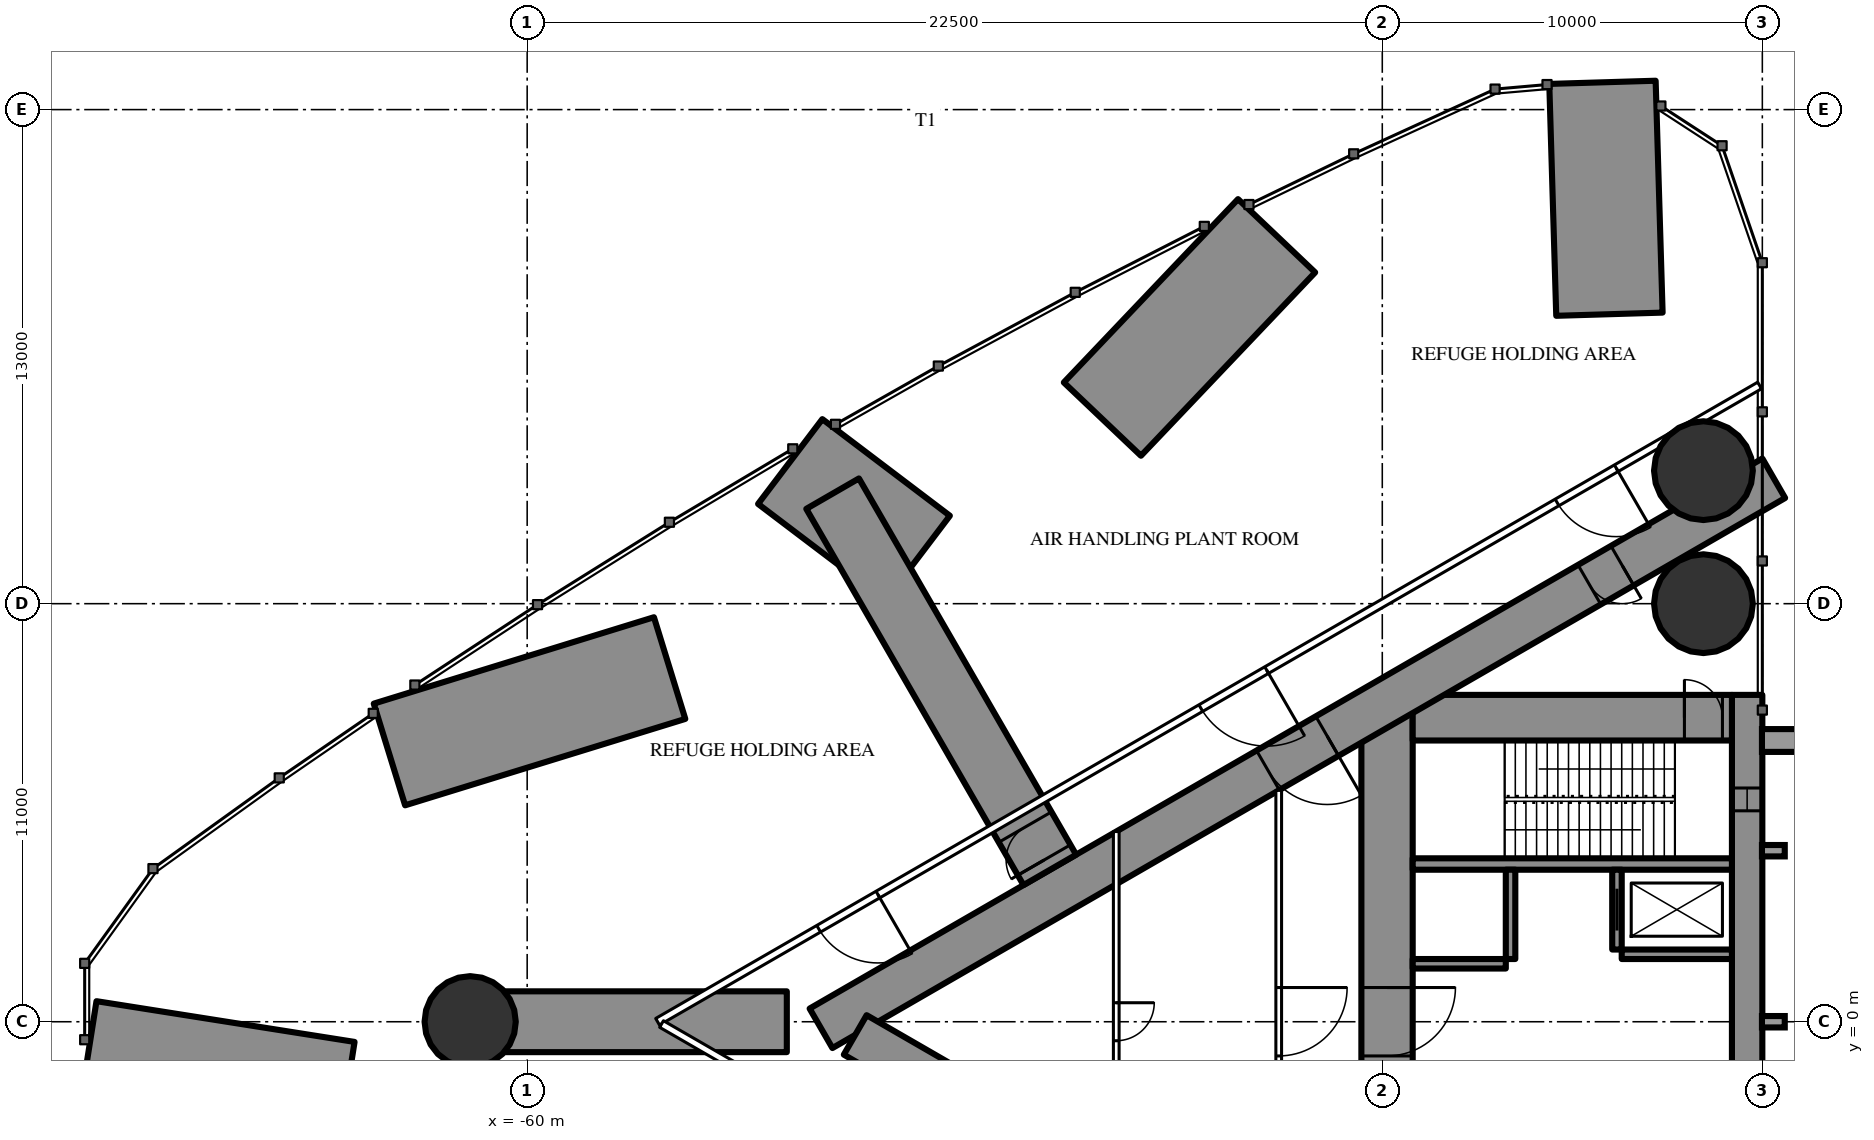
"""IFC4 building model, lengths in metres.
Left out: names, types, materials, properties, quantities, classifications, styles, units other than length and angle.
Written with IfcOpenShell. Run it as: python <this file> out.ifc"""

import sys

from ifc_helpers import new_model, si_unit, direction, frame, frame_2d, origin, origin_2d, place, context, subcontext, project, spatial, rectangle, circle, hollow_circle, extrude, element, fill, save


model = new_model("IFC4")
c1 = context("Model", 3, precision=1e-05, world=origin(), true_north=direction((0.0, 1.0)))
c2 = subcontext(c1, "Body", "Model", "MODEL_VIEW")
j1 = project(units=[si_unit("LENGTHUNIT", "METRE"), si_unit("PLANEANGLEUNIT", "RADIAN")], contexts=[c1])
p1 = place(None, origin())
s1 = spatial("IfcSite", under=j1, at=p1, CompositionType="ELEMENT")
p2 = place(p1, origin())
s2 = spatial("IfcBuilding", under=s1, at=p2, CompositionType="ELEMENT")
p3 = place(p2, frame((0.0, 0.0, 146.7)))
s3 = spatial("IfcBuildingStorey", under=s2, at=p3, CompositionType="ELEMENT", Elevation=146.7)
p4 = place(p3, frame((-71.551, -0.842, 0.0), z_axis=(0.0, 0.0, 1.0), x_axis=(0.987774767093, -0.155887810603, 0.0)))
e1 = element("IfcWall", 1, at=p4, inside=s3, PredefinedType="SHEAR", context=c2, shape_type="SweptSolid", body=[
    extrude(rectangle(XDim=6.875, YDim=2.8, at=frame_2d((3.438, 0.0))), origin(), (0.0, 0.0, 1.0), 6.0),
])
p5 = place(p3, frame((-31.707, 24.718, 0.0), z_axis=(0.0, 0.0, 1.0), x_axis=(0.029997298421, -0.999549979785, 0.0)))
e2 = element("IfcWall", 2, at=p5, inside=s3, PredefinedType="SHEAR", context=c2, shape_type="SweptSolid", body=[
    extrude(rectangle(XDim=6.104, YDim=2.8, at=frame_2d((3.052, 0.0))), origin(), (0.0, 0.0, 1.0), 6.0),
])
for number, where, z_axis, x_axis in (
    (3, (-29.05, 11.0, 0.0), (0.0, 0.0, 1.0), (1.0, 0.0, 0.0)),
    (4, (-29.05, 14.5, 0.0), (0.0, 0.0, 1.0), (1.0, 0.0, 0.0)),
):
    element("IfcColumn", number, at=place(p3, frame(where, z_axis=z_axis, x_axis=x_axis)), inside=s3, PredefinedType="COLUMN", context=c2, shape_type="SweptSolid", body=[
        extrude(hollow_circle(Radius=1.3, WallThickness=0.1, at=origin_2d()), origin(), (0.0, 0.0, 1.0), 6.0),
    ])
p6 = place(p3, frame((-40.281, 20.681, 0.0), z_axis=(0.0, 0.0, 1.0), x_axis=(-0.688883466121, -0.724872106033, 0.0)))
e5 = element("IfcWall", 5, at=p6, inside=s3, PredefinedType="SHEAR", context=c2, shape_type="SweptSolid", body=[
    extrude(rectangle(XDim=6.655, YDim=2.8, at=frame_2d((3.328, 0.0))), origin(), (0.0, 0.0, 1.0), 6.0),
])
p7 = place(p3, frame((-53.079, 14.74, 0.0), z_axis=(0.0, 0.0, 1.0), x_axis=(0.797075233676, -0.603880014457, 0.0)))
e6 = element("IfcWall", 6, at=p7, inside=s3, PredefinedType="SHEAR", context=c2, shape_type="SweptSolid", body=[
    extrude(rectangle(XDim=4.211, YDim=2.8, at=frame_2d((2.105, 0.0))), origin(), (0.0, 0.0, 1.0), 6.0),
])
p8 = place(p3, frame((-63.625, 7.032, 0.0), z_axis=(0.0, 0.0, 1.0), x_axis=(0.955592035737, 0.29469282522, 0.0)))
e7 = element("IfcWall", 7, at=p8, inside=s3, PredefinedType="SHEAR", context=c2, shape_type="SweptSolid", body=[
    extrude(rectangle(XDim=7.715, YDim=2.8, at=frame_2d((3.858, 0.0))), origin(), (0.0, 0.0, 1.0), 6.0),
])
p9 = place(p3, frame((-61.5, 0.0, 0.0), z_axis=(0.0, 0.0, 1.0), x_axis=(1.0, 0.0, 0.0)))
e8 = element("IfcColumn", 8, at=p9, inside=s3, PredefinedType="COLUMN", context=c2, shape_type="SweptSolid", body=[
    extrude(circle(Radius=1.2, at=origin_2d()), origin(), (0.0, 0.0, 1.0), 6.0),
])
p10 = place(p3, frame((-27.9, 8.6, 0.0), z_axis=(0.0, 0.0, 1.0), x_axis=(0.0, -1.0, 0.0)))
e9 = element("IfcWall", 9, at=p10, inside=s3, PredefinedType="SHEAR", context=c2, shape_type="SweptSolid", body=[
    extrude(rectangle(XDim=17.2, YDim=0.8, at=frame_2d((8.6, 0.0))), origin(), (0.0, 0.0, 1.0), 6.0),
])
p11 = place(p10, frame((2.45, 0.0, 0.6)))
e10 = element("IfcOpeningElement", 10, at=p11, cuts=e9, PredefinedType="OPENING", context=c2, shape_type="SweptSolid", body=[
    extrude(rectangle(XDim=0.6, YDim=4.5, at=frame_2d((0.3, 2.25))), frame((0.0, 0.41, 0.0), z_axis=(0.0, -1.0, 0.0), x_axis=(1.0, 0.0, 0.0)), (0.0, 0.0, 1.0), 0.82),
])
p12 = place(p10, frame((14.15, 0.0, 0.6)))
e11 = element("IfcOpeningElement", 11, at=p12, cuts=e9, PredefinedType="OPENING", context=c2, shape_type="SweptSolid", body=[
    extrude(rectangle(XDim=0.6, YDim=4.5, at=frame_2d((0.3, 2.25))), frame((0.0, 0.41, 0.0), z_axis=(0.0, -1.0, 0.0), x_axis=(1.0, 0.0, 0.0)), (0.0, 0.0, 1.0), 0.82),
])
p13 = place(p3, frame((-37.375, 8.6, 0.0), z_axis=(0.0, 0.0, 1.0), x_axis=(0.0, -1.0, 0.0)))
e12 = element("IfcWall", 12, at=p13, inside=s3, PredefinedType="SHEAR", context=c2, shape_type="SweptSolid", body=[
    extrude(rectangle(XDim=17.2, YDim=1.35, at=frame_2d((8.6, 0.0))), origin(), (0.0, 0.0, 1.0), 6.0),
])
p14 = place(p13, frame((7.7, 0.0, 0.0)))
e13 = element("IfcOpeningElement", 13, at=p14, cuts=e12, PredefinedType="OPENING", context=c2, shape_type="SweptSolid", body=[
    extrude(rectangle(XDim=1.8, YDim=2.2, at=frame_2d((0.9, 1.1))), frame((0.0, 0.685, 0.0), z_axis=(0.0, -1.0, 0.0), x_axis=(1.0, 0.0, 0.0)), (0.0, 0.0, 1.0), 1.37),
])
p15 = place(p3, frame((-28.3, 8.0, 0.0), z_axis=(0.0, 0.0, 1.0), x_axis=(-1.0, 0.0, 0.0)))
e14 = element("IfcWall", 14, at=p15, inside=s3, PredefinedType="SHEAR", context=c2, shape_type="SweptSolid", body=[
    extrude(rectangle(XDim=8.4, YDim=1.2, at=frame_2d((4.2, 0.0))), origin(), (0.0, 0.0, 1.0), 6.0),
])
p16 = place(p15, frame((0.25, 0.0, 0.0)))
e15 = element("IfcOpeningElement", 15, at=p16, cuts=e14, PredefinedType="OPENING", context=c2, shape_type="SweptSolid", body=[
    extrude(rectangle(XDim=1.0, YDim=2.2, at=frame_2d((0.5, 1.1))), frame((0.0, 0.61, 0.0), z_axis=(0.0, -1.0, 0.0), x_axis=(1.0, 0.0, 0.0)), (0.0, 0.0, 1.0), 1.22),
])
p17 = place(p3, frame((-28.3, 4.15, 0.0), z_axis=(0.0, 0.0, 1.0), x_axis=(-1.0, 0.0, 0.0)))
e16 = element("IfcWall", 16, at=p17, inside=s3, PredefinedType="SHEAR", context=c2, shape_type="SweptSolid", body=[
    extrude(rectangle(XDim=8.4, YDim=0.3, at=frame_2d((4.2, 0.0))), origin(), (0.0, 0.0, 1.0), 6.0),
])
p18 = place(p3, frame((-31.325, 4.0, 0.0), z_axis=(0.0, 0.0, 1.0), x_axis=(0.0, -1.0, 0.0)))
e17 = element("IfcWall", 17, at=p18, inside=s3, PredefinedType="SHEAR", context=c2, shape_type="SweptSolid", body=[
    extrude(rectangle(XDim=2.1, YDim=0.25, at=frame_2d((1.05, 0.0))), origin(), (0.0, 0.0, 1.0), 6.0),
])
p19 = place(p18, frame((0.5, 0.0, 0.0)))
e18 = element("IfcOpeningElement", 18, at=p19, cuts=e17, PredefinedType="OPENING", context=c2, shape_type="SweptSolid", body=[
    extrude(rectangle(XDim=1.1, YDim=2.2, at=frame_2d((0.55, 1.1))), frame((0.0, 0.135, 0.0), z_axis=(0.0, -1.0, 0.0), x_axis=(1.0, 0.0, 0.0)), (0.0, 0.0, 1.0), 0.27),
])
p20 = place(p3, frame((-34.125, 4.0, 0.0), z_axis=(0.0, 0.0, 1.0), x_axis=(0.0, -1.0, 0.0)))
e19 = element("IfcWall", 19, at=p20, inside=s3, PredefinedType="SHEAR", context=c2, shape_type="SweptSolid", body=[
    extrude(rectangle(XDim=2.35, YDim=0.25, at=frame_2d((1.175, 0.0))), origin(), (0.0, 0.0, 1.0), 6.0),
])
p21 = place(p3, frame((-28.3, 1.775, 0.0), z_axis=(0.0, 0.0, 1.0), x_axis=(-1.0, 0.0, 0.0)))
e20 = element("IfcWall", 20, at=p21, inside=s3, PredefinedType="SHEAR", context=c2, shape_type="SweptSolid", body=[
    extrude(rectangle(XDim=2.9, YDim=0.25, at=frame_2d((1.45, 0.0))), origin(), (0.0, 0.0, 1.0), 6.0),
])
p22 = place(p3, frame((-34.25, 1.525, 0.0), z_axis=(0.0, 0.0, 1.0), x_axis=(-1.0, 0.0, 0.0)))
e21 = element("IfcWall", 21, at=p22, inside=s3, PredefinedType="SHEAR", context=c2, shape_type="SweptSolid", body=[
    extrude(rectangle(XDim=2.45, YDim=0.25, at=frame_2d((1.225, 0.0))), origin(), (0.0, 0.0, 1.0), 6.0),
])
p23 = place(p3, frame((-27.2, 14.3, 0.0), z_axis=(0.0, 0.0, 1.0), x_axis=(-0.866026593062, -0.499997940104, 0.0)))
e22 = element("IfcWall", 22, at=p23, inside=s3, PredefinedType="SHEAR", context=c2, shape_type="SweptSolid", body=[
    extrude(rectangle(XDim=28.946, YDim=1.2, at=frame_2d((14.473, 0.0))), origin(), (0.0, 0.0, 1.0), 6.0),
])
p24 = place(p23, frame((4.6, 0.0, 0.0)))
e23 = element("IfcOpeningElement", 23, at=p24, cuts=e22, PredefinedType="OPENING", context=c2, shape_type="SweptSolid", body=[
    extrude(rectangle(XDim=1.0, YDim=2.2, at=frame_2d((0.5, 1.1))), frame((0.0, 0.61, 0.0), z_axis=(0.0, -1.0, 0.0), x_axis=(1.0, 0.0, 0.0)), (0.0, 0.0, 1.0), 1.22),
])
p25 = place(p23, frame((13.568, 0.0, 0.0)))
e24 = element("IfcOpeningElement", 24, at=p25, cuts=e22, PredefinedType="OPENING", context=c2, shape_type="SweptSolid", body=[
    extrude(rectangle(XDim=1.8, YDim=2.2, at=frame_2d((0.9, 1.1))), frame((0.0, 0.61, 0.0), z_axis=(0.0, -1.0, 0.0), x_axis=(1.0, 0.0, 0.0)), (0.0, 0.0, 1.0), 1.22),
])
p26 = place(p3, frame((-27.2, -14.3, 0.0), z_axis=(0.0, 0.0, 1.0), x_axis=(-0.866024021859, 0.500002393557, 0.0)))
e25 = element("IfcWall", 25, at=p26, inside=s3, PredefinedType="SHEAR", context=c2, shape_type="SweptSolid", body=[
    extrude(rectangle(XDim=27.907, YDim=1.2, at=frame_2d((13.954, 0.0))), origin(), (0.0, 0.0, 1.0), 6.0),
])
p27 = place(p26, frame((4.6, 0.0, 0.0)))
e26 = element("IfcOpeningElement", 26, at=p27, cuts=e25, PredefinedType="OPENING", context=c2, shape_type="SweptSolid", body=[
    extrude(rectangle(XDim=1.0, YDim=2.2, at=frame_2d((0.5, 1.1))), frame((0.0, 0.61, 0.0), z_axis=(0.0, -1.0, 0.0), x_axis=(1.0, 0.0, 0.0)), (0.0, 0.0, 1.0), 1.22),
])
p28 = place(p26, frame((13.568, 0.0, 0.0)))
e27 = element("IfcOpeningElement", 27, at=p28, cuts=e25, PredefinedType="OPENING", context=c2, shape_type="SweptSolid", body=[
    extrude(rectangle(XDim=1.8, YDim=2.2, at=frame_2d((0.9, 1.1))), frame((0.0, 0.61, 0.0), z_axis=(0.0, -1.0, 0.0), x_axis=(1.0, 0.0, 0.0)), (0.0, 0.0, 1.0), 1.22),
])
p29 = place(p3, frame((-46.248, 3.996, 0.0), z_axis=(0.0, 0.0, 1.0), x_axis=(-0.499993613132, 0.866029091213, 0.0)))
e28 = element("IfcWall", 28, at=p29, inside=s3, PredefinedType="SHEAR", context=c2, shape_type="SweptSolid", body=[
    extrude(rectangle(XDim=11.431, YDim=1.6, at=frame_2d((5.715, 0.0))), origin(), (0.0, 0.0, 1.0), 6.0),
])
p30 = place(p29, frame((0.3, 0.0, 0.0)))
e29 = element("IfcOpeningElement", 29, at=p30, cuts=e28, PredefinedType="OPENING", context=c2, shape_type="SweptSolid", body=[
    extrude(rectangle(XDim=1.0, YDim=2.2, at=frame_2d((0.5, 1.1))), frame((0.0, 0.81, 0.0), z_axis=(0.0, -1.0, 0.0), x_axis=(1.0, 0.0, 0.0)), (0.0, 0.0, 1.0), 1.62),
])
p31 = place(p3, frame((-53.168, 0.0, 0.0), z_axis=(0.0, 0.0, 1.0), x_axis=(-1.0, 0.0, 0.0)))
e30 = element("IfcWall", 30, at=p31, inside=s3, PredefinedType="SHEAR", context=c2, shape_type="SweptSolid", body=[
    extrude(rectangle(XDim=8.332, YDim=1.6, at=frame_2d((4.166, 0.0))), origin(), (0.0, 0.0, 1.0), 6.0),
])
p32 = place(p3, frame((-27.572, 16.741, 0.0), z_axis=(0.0, 0.0, 1.0), x_axis=(-0.866026395587, -0.499998282143, 0.0)))
e31 = element("IfcWall", 31, at=p32, inside=s3, PredefinedType="PARTITIONING", context=c2, shape_type="SweptSolid", body=[
    extrude(rectangle(XDim=33.482, YDim=0.2, at=frame_2d((16.741, 0.0))), origin(), (0.0, 0.0, 1.0), 5.75),
])
p33 = place(p32, frame((4.354, 0.0, 0.0)))
e32 = element("IfcOpeningElement", 32, at=p33, cuts=e31, PredefinedType="OPENING", context=c2, shape_type="SweptSolid", body=[
    extrude(rectangle(XDim=1.8, YDim=2.2, at=frame_2d((0.9, 1.1))), frame((0.0, 0.11, 0.0), z_axis=(0.0, -1.0, 0.0), x_axis=(1.0, 0.0, 0.0)), (0.0, 0.0, 1.0), 0.22),
])
p34 = place(p32, frame((14.977, 0.0, 0.0)))
e33 = element("IfcOpeningElement", 33, at=p34, cuts=e31, PredefinedType="OPENING", context=c2, shape_type="SweptSolid", body=[
    extrude(rectangle(XDim=2.0, YDim=2.4, at=frame_2d((1.0, 1.2))), frame((0.0, 0.11, 0.0), z_axis=(0.0, -1.0, 0.0), x_axis=(1.0, 0.0, 0.0)), (0.0, 0.0, 1.0), 0.22),
])
p35 = place(p32, frame((26.788, 0.0, 0.0)))
e34 = element("IfcOpeningElement", 34, at=p35, cuts=e31, PredefinedType="OPENING", context=c2, shape_type="SweptSolid", body=[
    extrude(rectangle(XDim=1.8, YDim=2.2, at=frame_2d((0.9, 1.1))), frame((0.0, 0.11, 0.0), z_axis=(0.0, -1.0, 0.0), x_axis=(1.0, 0.0, 0.0)), (0.0, 0.0, 1.0), 0.22),
])
p36 = place(p3, frame((-36.92, -11.344, 0.0), z_axis=(0.0, 0.0, 1.0), x_axis=(-0.866028313256, 0.499994960614, 0.0)))
e35 = element("IfcWall", 35, at=p36, inside=s3, PredefinedType="PARTITIONING", context=c2, shape_type="SweptSolid", body=[
    extrude(rectangle(XDim=22.568, YDim=0.2, at=frame_2d((11.284, 0.0))), origin(), (0.0, 0.0, 1.0), 5.75),
])
p37 = place(p36, frame((15.994, 0.0, 0.0)))
e36 = element("IfcOpeningElement", 36, at=p37, cuts=e35, PredefinedType="OPENING", context=c2, shape_type="SweptSolid", body=[
    extrude(rectangle(XDim=1.8, YDim=2.2, at=frame_2d((0.9, 1.1))), frame((0.0, 0.11, 0.0), z_axis=(0.0, -1.0, 0.0), x_axis=(1.0, 0.0, 0.0)), (0.0, 0.0, 1.0), 0.22),
])
p38 = place(p36, frame((4.651, 0.0, 0.0)))
e37 = element("IfcOpeningElement", 37, at=p38, cuts=e35, PredefinedType="OPENING", context=c2, shape_type="SweptSolid", body=[
    extrude(rectangle(XDim=1.8, YDim=2.2, at=frame_2d((0.9, 1.1))), frame((0.0, 0.11, 0.0), z_axis=(0.0, -1.0, 0.0), x_axis=(1.0, 0.0, 0.0)), (0.0, 0.0, 1.0), 0.22),
])
p39 = place(p3, frame((-40.225, 6.087, 0.0), z_axis=(0.0, 0.0, 1.0), x_axis=(0.0, -1.0, 0.0)))
e38 = element("IfcWall", 38, at=p39, inside=s3, PredefinedType="PARTITIONING", context=c2, shape_type="SweptSolid", body=[
    extrude(rectangle(XDim=12.174, YDim=0.15, at=frame_2d((6.087, 0.0))), origin(), (0.0, 0.0, 1.0), 5.75),
])
p40 = place(p39, frame((5.187, 0.0, 0.0)))
e39 = element("IfcOpeningElement", 39, at=p40, cuts=e38, PredefinedType="OPENING", context=c2, shape_type="SweptSolid", body=[
    extrude(rectangle(XDim=1.8, YDim=2.2, at=frame_2d((0.9, 1.1))), frame((0.0, 0.085, 0.0), z_axis=(0.0, -1.0, 0.0), x_axis=(1.0, 0.0, 0.0)), (0.0, 0.0, 1.0), 0.17),
])
p41 = place(p3, frame((-44.5, 5.005, 0.0), z_axis=(0.0, 0.0, 1.0), x_axis=(0.0, -1.0, 0.0)))
e40 = element("IfcWall", 40, at=p41, inside=s3, PredefinedType="PARTITIONING", context=c2, shape_type="SweptSolid", body=[
    extrude(rectangle(XDim=10.009, YDim=0.15, at=frame_2d((5.005, 0.0))), origin(), (0.0, 0.0, 1.0), 5.75),
])
p42 = place(p41, frame((4.505, 0.0, 0.0)))
e41 = element("IfcOpeningElement", 41, at=p42, cuts=e40, PredefinedType="OPENING", context=c2, shape_type="SweptSolid", body=[
    extrude(rectangle(XDim=1.0, YDim=2.2, at=frame_2d((0.5, 1.1))), frame((0.0, 0.085, 0.0), z_axis=(0.0, -1.0, 0.0), x_axis=(1.0, 0.0, 0.0)), (0.0, 0.0, 1.0), 0.17),
])
p43 = place(p30, origin())
e42 = element("IfcDoor", 42, at=p43, inside=s3, OperationType="SINGLE_SWING_LEFT", PredefinedType="DOOR", context=c2, shape_type="SweptSolid", body=[
    extrude(rectangle(XDim=1.0, YDim=2.2, at=frame_2d((0.5, 1.1))), frame((0.0, 0.025, 0.0), z_axis=(0.0, -1.0, 0.0), x_axis=(1.0, 0.0, 0.0)), (0.0, 0.0, 1.0), 0.05),
])
fill(e29, e42)
p44 = place(p33, origin())
e43 = element("IfcDoor", 43, at=p44, inside=s3, OperationType="DOUBLE_DOOR_SINGLE_SWING", PredefinedType="DOOR", context=c2, shape_type="SweptSolid", body=[
    extrude(rectangle(XDim=1.8, YDim=2.2, at=frame_2d((0.9, 1.1))), frame((0.0, 0.025, 0.0), z_axis=(0.0, -1.0, 0.0), x_axis=(1.0, 0.0, 0.0)), (0.0, 0.0, 1.0), 0.05),
])
fill(e32, e43)
p45 = place(p34, origin())
e44 = element("IfcDoor", 44, at=p45, inside=s3, OperationType="DOUBLE_DOOR_SINGLE_SWING", PredefinedType="DOOR", context=c2, shape_type="SweptSolid", body=[
    extrude(rectangle(XDim=2.0, YDim=2.4, at=frame_2d((1.0, 1.2))), frame((0.0, 0.025, 0.0), z_axis=(0.0, -1.0, 0.0), x_axis=(1.0, 0.0, 0.0)), (0.0, 0.0, 1.0), 0.05),
])
fill(e33, e44)
p46 = place(p35, origin())
e45 = element("IfcDoor", 45, at=p46, inside=s3, OperationType="DOUBLE_DOOR_SINGLE_SWING", PredefinedType="DOOR", context=c2, shape_type="SweptSolid", body=[
    extrude(rectangle(XDim=1.8, YDim=2.2, at=frame_2d((0.9, 1.1))), frame((0.0, 0.025, 0.0), z_axis=(0.0, -1.0, 0.0), x_axis=(1.0, 0.0, 0.0)), (0.0, 0.0, 1.0), 0.05),
])
fill(e34, e45)
p47 = place(p40, origin())
e46 = element("IfcDoor", 46, at=p47, inside=s3, OperationType="DOUBLE_DOOR_SINGLE_SWING", PredefinedType="DOOR", context=c2, shape_type="SweptSolid", body=[
    extrude(rectangle(XDim=1.8, YDim=2.2, at=frame_2d((0.9, 1.1))), frame((0.0, 0.025, 0.0), z_axis=(0.0, -1.0, 0.0), x_axis=(1.0, 0.0, 0.0)), (0.0, 0.0, 1.0), 0.05),
])
fill(e39, e46)
p48 = place(p42, origin())
e47 = element("IfcDoor", 47, at=p48, inside=s3, OperationType="SINGLE_SWING_LEFT", PredefinedType="DOOR", context=c2, shape_type="SweptSolid", body=[
    extrude(rectangle(XDim=1.0, YDim=2.2, at=frame_2d((0.5, 1.1))), frame((0.0, 0.025, 0.0), z_axis=(0.0, -1.0, 0.0), x_axis=(1.0, 0.0, 0.0)), (0.0, 0.0, 1.0), 0.05),
])
fill(e41, e47)
p49 = place(p24, origin())
e48 = element("IfcDoor", 48, at=p49, inside=s3, OperationType="SINGLE_SWING_LEFT", PredefinedType="DOOR", context=c2, shape_type="SweptSolid", body=[
    extrude(rectangle(XDim=1.0, YDim=2.2, at=frame_2d((0.5, 1.1))), frame((0.0, 0.025, 0.0), z_axis=(0.0, -1.0, 0.0), x_axis=(1.0, 0.0, 0.0)), (0.0, 0.0, 1.0), 0.05),
])
fill(e23, e48)
p50 = place(p25, origin())
e49 = element("IfcDoor", 49, at=p50, inside=s3, OperationType="DOUBLE_DOOR_SINGLE_SWING", PredefinedType="DOOR", context=c2, shape_type="SweptSolid", body=[
    extrude(rectangle(XDim=1.8, YDim=2.2, at=frame_2d((0.9, 1.1))), frame((0.0, 0.025, 0.0), z_axis=(0.0, -1.0, 0.0), x_axis=(1.0, 0.0, 0.0)), (0.0, 0.0, 1.0), 0.05),
])
fill(e24, e49)
p51 = place(p14, origin())
e50 = element("IfcDoor", 50, at=p51, inside=s3, OperationType="DOUBLE_DOOR_SINGLE_SWING", PredefinedType="DOOR", context=c2, shape_type="SweptSolid", body=[
    extrude(rectangle(XDim=1.8, YDim=2.2, at=frame_2d((0.9, 1.1))), frame((0.0, 0.025, 0.0), z_axis=(0.0, -1.0, 0.0), x_axis=(1.0, 0.0, 0.0)), (0.0, 0.0, 1.0), 0.05),
])
fill(e13, e50)
p52 = place(p16, origin())
e51 = element("IfcDoor", 51, at=p52, inside=s3, OperationType="SINGLE_SWING_RIGHT", PredefinedType="DOOR", context=c2, shape_type="SweptSolid", body=[
    extrude(rectangle(XDim=1.0, YDim=2.2, at=frame_2d((0.5, 1.1))), frame((0.0, 0.025, 0.0), z_axis=(0.0, -1.0, 0.0), x_axis=(1.0, 0.0, 0.0)), (0.0, 0.0, 1.0), 0.05),
])
fill(e15, e51)
p53 = place(p19, origin())
e52 = element("IfcDoor", 52, at=p53, inside=s3, OperationType="SLIDING_TO_LEFT", PredefinedType="USERDEFINED", context=c2, shape_type="SweptSolid", body=[
    extrude(rectangle(XDim=1.1, YDim=2.2, at=frame_2d((0.55, 1.1))), frame((0.0, 0.025, 0.0), z_axis=(0.0, -1.0, 0.0), x_axis=(1.0, 0.0, 0.0)), (0.0, 0.0, 1.0), 0.05),
])
fill(e18, e52)
p54 = place(p11, origin())
e53 = element("IfcWindow", 53, at=p54, inside=s3, PartitioningType="SINGLE_PANEL", PredefinedType="WINDOW", context=c2, shape_type="SweptSolid", body=[
    extrude(rectangle(XDim=0.6, YDim=4.5, at=frame_2d((0.3, 2.25))), frame((0.0, 0.03, 0.0), z_axis=(0.0, -1.0, 0.0), x_axis=(1.0, 0.0, 0.0)), (0.0, 0.0, 1.0), 0.06),
])
fill(e10, e53)
save(model, sys.argv[1])
